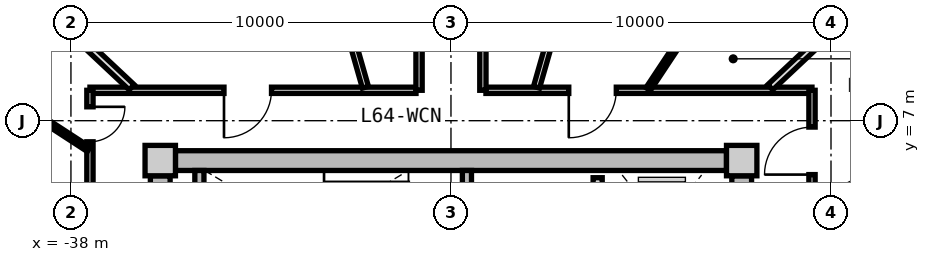
"""IFC4 building model, lengths in metres.
Left out: names, types, materials, properties, quantities, classifications, styles, units other than length and angle.
Written with IfcOpenShell. Run it as: python <this file> out.ifc"""

import sys

from ifc_helpers import new_model, si_unit, direction, frame, frame_2d, origin, origin_2d, place, context, subcontext, project, spatial, rectangle, extrude, source, transform, mapped, element, fill, save


model = new_model("IFC4")
c1 = context("Model", 3, precision=1e-05, world=origin(), true_north=direction((0.0, 1.0)))
c2 = subcontext(c1, "Body", "Model", "MODEL_VIEW")
j1 = project(units=[si_unit("LENGTHUNIT", "METRE"), si_unit("PLANEANGLEUNIT", "RADIAN")], contexts=[c1])
p1 = place(None, origin())
s1 = spatial("IfcSite", under=j1, at=p1, CompositionType="ELEMENT")
p2 = place(p1, origin())
s2 = spatial("IfcBuilding", under=s1, at=p2, CompositionType="ELEMENT")
p3 = place(p2, frame((0.0, 0.0, 207.8)))
s3 = spatial("IfcBuildingStorey", under=s2, at=p3, CompositionType="ELEMENT", Elevation=207.8)
m1 = source(origin(), c2, "Body", "SweptSolid", [
    extrude(rectangle(XDim=0.8, YDim=0.8, at=origin_2d()), origin(), (0.0, 0.0, 1.0), 3.05),
])
for number, where, z_axis, x_axis in (
    (1, (-20.35, 5.95, 0.0), (0.0, 0.0, 1.0), (1.0, 0.0, 0.0)),
    (2, (-35.65, 5.95, 0.0), (0.0, 0.0, 1.0), (1.0, 0.0, 0.0)),
):
    element("IfcColumn", number, at=place(p3, frame(where, z_axis=z_axis, x_axis=x_axis)), inside=s3, PredefinedType="COLUMN", context=c2, shape_type="MappedRepresentation", body=[
        mapped(m1, transform((0.0, 0.0, 0.0), x_axis=(1.0, 0.0, 0.0), y_axis=(0.0, 1.0, 0.0), z_axis=(0.0, 0.0, 1.0), scale=1.0)),
    ])
m2 = source(origin(), c2, "Body", "SweptSolid", [
    extrude(rectangle(XDim=14.5, YDim=0.52, at=frame_2d((7.25, 0.0))), origin(), (0.0, 0.0, 1.0), 2.76),
])
p4 = place(p3, frame((-35.25, 5.95, 0.0), z_axis=(0.0, 0.0, 1.0), x_axis=(1.0, 0.0, 0.0)))
e3 = element("IfcWall", 3, at=p4, inside=s3, PredefinedType="SHEAR", context=c2, shape_type="MappedRepresentation", body=[
    mapped(m2, transform((0.0, 0.0, 0.0), x_axis=(1.0, 0.0, 0.0), y_axis=(0.0, 1.0, 0.0), z_axis=(0.0, 0.0, 1.0), scale=1.0)),
])
m3 = source(origin(), c2, "Body", "SweptSolid", [
    extrude(rectangle(XDim=11.1, YDim=0.52, at=frame_2d((5.55, 0.0))), origin(), (0.0, 0.0, 1.0), 2.76),
])
p5 = place(p3, frame((-35.65, -5.55, 0.0), z_axis=(0.0, 0.0, 1.0), x_axis=(0.0, 1.0, 0.0)))
e4 = element("IfcWall", 4, at=p5, inside=s3, PredefinedType="SHEAR", context=c2, shape_type="MappedRepresentation", body=[
    mapped(m3, transform((0.0, 0.0, 0.0), x_axis=(1.0, 0.0, 0.0), y_axis=(0.0, 1.0, 0.0), z_axis=(0.0, 0.0, 1.0), scale=1.0)),
])
p6 = place(p5, frame((3.8, 0.0, 0.0)))
e5 = element("IfcOpeningElement", 5, at=p6, cuts=e4, PredefinedType="OPENING", context=c2, shape_type="SweptSolid", body=[
    extrude(rectangle(XDim=1.2, YDim=2.15, at=frame_2d((0.6, 1.075))), frame((0.0, 0.27, 0.0), z_axis=(0.0, -1.0, 0.0), x_axis=(1.0, 0.0, 0.0)), (0.0, 0.0, 1.0), 0.54),
])
p7 = place(p3, frame((-20.35, 5.55, 0.0), z_axis=(0.0, 0.0, 1.0), x_axis=(0.0, -1.0, 0.0)))
e6 = element("IfcWall", 6, at=p7, inside=s3, PredefinedType="SHEAR", context=c2, shape_type="MappedRepresentation", body=[
    mapped(m3, transform((0.0, 0.0, 0.0), x_axis=(1.0, 0.0, 0.0), y_axis=(0.0, 1.0, 0.0), z_axis=(0.0, 0.0, 1.0), scale=1.0)),
])
p8 = place(p7, frame((5.65, 0.0, 0.0)))
e7 = element("IfcOpeningElement", 7, at=p8, cuts=e6, PredefinedType="OPENING", context=c2, shape_type="SweptSolid", body=[
    extrude(rectangle(XDim=1.2, YDim=2.15, at=frame_2d((0.6, 1.075))), frame((0.0, 0.27, 0.0), z_axis=(0.0, -1.0, 0.0), x_axis=(1.0, 0.0, 0.0)), (0.0, 0.0, 1.0), 0.54),
])
p9 = place(p7, frame((9.3, 0.0, 0.0)))
e8 = element("IfcOpeningElement", 8, at=p9, cuts=e6, PredefinedType="OPENING", context=c2, shape_type="SweptSolid", body=[
    extrude(rectangle(XDim=1.0, YDim=2.1, at=frame_2d((0.5, 1.05))), frame((0.0, 0.27, 0.0), z_axis=(0.0, -1.0, 0.0), x_axis=(1.0, 0.0, 0.0)), (0.0, 0.0, 1.0), 0.54),
])
m4 = source(origin(), c2, "Body", "SweptSolid", [
    extrude(rectangle(XDim=3.24, YDim=0.24, at=frame_2d((1.62, 0.0))), origin(), (0.0, 0.0, 1.0), 2.76),
])
p10 = place(p3, frame((-34.62, 2.45, 0.0), z_axis=(0.0, 0.0, 1.0), x_axis=(0.0, 1.0, 0.0)))
e9 = element("IfcWall", 9, at=p10, inside=s3, PredefinedType="PARTITIONING", context=c2, shape_type="MappedRepresentation", body=[
    mapped(m4, transform((0.0, 0.0, 0.0), x_axis=(1.0, 0.0, 0.0), y_axis=(0.0, 1.0, 0.0), z_axis=(0.0, 0.0, 1.0), scale=1.0)),
])
p11 = place(p3, frame((-27.58, 2.45, 0.0), z_axis=(0.0, 0.0, 1.0), x_axis=(0.0, 1.0, 0.0)))
e10 = element("IfcWall", 10, at=p11, inside=s3, PredefinedType="PARTITIONING", context=c2, shape_type="MappedRepresentation", body=[
    mapped(m4, transform((0.0, 0.0, 0.0), x_axis=(1.0, 0.0, 0.0), y_axis=(0.0, 1.0, 0.0), z_axis=(0.0, 0.0, 1.0), scale=1.0)),
])
p12 = place(p11, frame((0.55, 0.0, 0.0)))
e11 = element("IfcOpeningElement", 11, at=p12, cuts=e10, PredefinedType="OPENING", context=c2, shape_type="SweptSolid", body=[
    extrude(rectangle(XDim=1.1, YDim=2.15, at=frame_2d((0.55, 1.075))), frame((0.0, 0.13, 0.0), z_axis=(0.0, -1.0, 0.0), x_axis=(1.0, 0.0, 0.0)), (0.0, 0.0, 1.0), 0.26),
])
m5 = source(origin(), c2, "Body", "SweptSolid", [
    extrude(rectangle(XDim=5.0, YDim=0.24, at=frame_2d((2.5, 0.0))), origin(), (0.0, 0.0, 1.0), 2.745),
])
p13 = place(p3, frame((-24.14, 0.5, 0.0), z_axis=(0.0, 0.0, 1.0), x_axis=(0.0, 1.0, 0.0)))
e12 = element("IfcWall", 12, at=p13, inside=s3, PredefinedType="PARTITIONING", context=c2, shape_type="MappedRepresentation", body=[
    mapped(m5, transform((0.0, 0.0, 0.0), x_axis=(1.0, 0.0, 0.0), y_axis=(0.0, 1.0, 0.0), z_axis=(0.0, 0.0, 1.0), scale=1.0)),
])
p14 = place(p13, frame((3.05, 0.0, 0.0)))
e13 = element("IfcOpeningElement", 13, at=p14, cuts=e12, PredefinedType="OPENING", context=c2, shape_type="SweptSolid", body=[
    extrude(rectangle(XDim=1.3, YDim=2.2, at=frame_2d((0.65, 1.1))), frame((0.0, 0.13, 0.0), z_axis=(0.0, -1.0, 0.0), x_axis=(1.0, 0.0, 0.0)), (0.0, 0.0, 1.0), 0.26),
])
p15 = place(p13, frame((0.55, 0.0, 0.0)))
e14 = element("IfcOpeningElement", 14, at=p15, cuts=e12, PredefinedType="OPENING", context=c2, shape_type="SweptSolid", body=[
    extrude(rectangle(XDim=1.3, YDim=2.2, at=frame_2d((0.65, 1.1))), frame((0.0, 0.13, 0.0), z_axis=(0.0, -1.0, 0.0), x_axis=(1.0, 0.0, 0.0)), (0.0, 0.0, 1.0), 0.26),
])
m6 = source(origin(), c2, "Body", "SweptSolid", [
    extrude(rectangle(XDim=8.58, YDim=0.165, at=frame_2d((4.29, 0.0))), origin(), (0.0, 0.0, 1.0), 2.745),
])
p16 = place(p3, frame((-37.5, 7.8, 0.0), z_axis=(0.0, 0.0, 1.0), x_axis=(1.0, 0.0, 0.0)))
e15 = element("IfcWall", 15, at=p16, inside=s3, PredefinedType="PARTITIONING", context=c2, shape_type="MappedRepresentation", body=[
    mapped(m6, transform((0.0, 0.0, 0.0), x_axis=(1.0, 0.0, 0.0), y_axis=(0.0, 1.0, 0.0), z_axis=(0.0, 0.0, 1.0), scale=1.0)),
])
p17 = place(p16, frame((3.528, 0.0, 0.0)))
e16 = element("IfcOpeningElement", 16, at=p17, cuts=e15, PredefinedType="OPENING", context=c2, shape_type="SweptSolid", body=[
    extrude(rectangle(XDim=1.25, YDim=2.2, at=frame_2d((0.625, 1.1))), frame((0.0, 0.093, 0.0), z_axis=(0.0, -1.0, 0.0), x_axis=(1.0, 0.0, 0.0)), (0.0, 0.0, 1.0), 0.185),
])
p18 = place(p3, frame((-27.08, 7.8, 0.0), z_axis=(0.0, 0.0, 1.0), x_axis=(1.0, 0.0, 0.0)))
e17 = element("IfcWall", 17, at=p18, inside=s3, PredefinedType="PARTITIONING", context=c2, shape_type="MappedRepresentation", body=[
    mapped(m6, transform((0.0, 0.0, 0.0), x_axis=(1.0, 0.0, 0.0), y_axis=(0.0, 1.0, 0.0), z_axis=(0.0, 0.0, 1.0), scale=1.0)),
])
p19 = place(p18, frame((2.18, 0.0, 0.0)))
e18 = element("IfcOpeningElement", 18, at=p19, cuts=e17, PredefinedType="OPENING", context=c2, shape_type="SweptSolid", body=[
    extrude(rectangle(XDim=1.25, YDim=2.2, at=frame_2d((0.625, 1.1))), frame((0.0, 0.093, 0.0), z_axis=(0.0, -1.0, 0.0), x_axis=(1.0, 0.0, 0.0)), (0.0, 0.0, 1.0), 0.185),
])
m7 = source(origin(), c2, "Body", "SweptSolid", [
    extrude(rectangle(XDim=6.88, YDim=0.165, at=frame_2d((3.44, 0.0))), origin(), (0.0, 0.0, 1.0), 2.745),
])
p20 = place(p3, frame((-37.5, 0.92, 0.0), z_axis=(0.0, 0.0, 1.0), x_axis=(0.0, 1.0, 0.0)))
e19 = element("IfcWall", 19, at=p20, inside=s3, PredefinedType="PARTITIONING", context=c2, shape_type="MappedRepresentation", body=[
    mapped(m7, transform((0.0, 0.0, 0.0), x_axis=(1.0, 0.0, 0.0), y_axis=(0.0, 1.0, 0.0), z_axis=(0.0, 0.0, 1.0), scale=1.0)),
])
p21 = place(p20, frame((5.525, 0.0, 0.0)))
e20 = element("IfcOpeningElement", 20, at=p21, cuts=e19, PredefinedType="OPENING", context=c2, shape_type="SweptSolid", body=[
    extrude(rectangle(XDim=0.92, YDim=2.1, at=frame_2d((0.46, 1.05))), frame((0.0, 0.093, 0.0), z_axis=(0.0, -1.0, 0.0), x_axis=(1.0, 0.0, 0.0)), (0.0, 0.0, 1.0), 0.185),
])
p22 = place(p20, frame((2.962, 0.0, 0.0)))
e21 = element("IfcOpeningElement", 21, at=p22, cuts=e19, PredefinedType="OPENING", context=c2, shape_type="SweptSolid", body=[
    extrude(rectangle(XDim=0.92, YDim=2.1, at=frame_2d((0.46, 1.05))), frame((0.0, 0.093, 0.0), z_axis=(0.0, -1.0, 0.0), x_axis=(1.0, 0.0, 0.0)), (0.0, 0.0, 1.0), 0.185),
])
p23 = place(p3, frame((-18.5, 7.8, 0.0), z_axis=(0.0, 0.0, 1.0), x_axis=(0.0, -1.0, 0.0)))
e22 = element("IfcWall", 22, at=p23, inside=s3, PredefinedType="PARTITIONING", context=c2, shape_type="MappedRepresentation", body=[
    mapped(m7, transform((0.0, 0.0, 0.0), x_axis=(1.0, 0.0, 0.0), y_axis=(0.0, 1.0, 0.0), z_axis=(0.0, 0.0, 1.0), scale=1.0)),
])
p24 = place(p23, frame((0.968, 0.0, 0.0)))
e23 = element("IfcOpeningElement", 23, at=p24, cuts=e22, PredefinedType="OPENING", context=c2, shape_type="SweptSolid", body=[
    extrude(rectangle(XDim=1.25, YDim=2.2, at=frame_2d((0.625, 1.1))), frame((0.0, 0.093, 0.0), z_axis=(0.0, -1.0, 0.0), x_axis=(1.0, 0.0, 0.0)), (0.0, 0.0, 1.0), 0.185),
])
m8 = source(origin(), c2, "Body", "SweptSolid", [
    extrude(rectangle(XDim=6.974, YDim=0.165, at=frame_2d((3.487, 0.0))), origin(), (0.0, 0.0, 1.0), 2.345),
])
for number, where, z_axis, x_axis in (
    (24, (-25.749, 7.88, 0.0), (0.0, 0.0, 1.0), (0.275, 0.962, 0.0)),
    (25, (-30.251, 7.88, 0.0), (0.0, 0.0, 1.0), (-0.275, 0.962, 0.0)),
):
    element("IfcWall", number, at=place(p3, frame(where, z_axis=z_axis, x_axis=x_axis)), inside=s3, PredefinedType="PARTITIONING", context=c2, shape_type="MappedRepresentation", body=[
        mapped(m8, transform((0.0, 0.0, 0.0), x_axis=(1.0, 0.0, 0.0), y_axis=(0.0, 1.0, 0.0), z_axis=(0.0, 0.0, 1.0), scale=1.0)),
    ])
m9 = source(origin(), c2, "Body", "SweptSolid", [
    extrude(rectangle(XDim=6.835, YDim=0.165, at=frame_2d((3.418, 0.0))), origin(), (0.0, 0.0, 1.0), 2.745),
])
p25 = place(p3, frame((-28.84, 7.8, 0.0), z_axis=(0.0, 0.0, 1.0), x_axis=(0.0, 1.0, 0.0)))
e26 = element("IfcWall", 26, at=p25, inside=s3, PredefinedType="PARTITIONING", context=c2, shape_type="MappedRepresentation", body=[
    mapped(m9, transform((0.0, 0.0, 0.0), x_axis=(1.0, 0.0, 0.0), y_axis=(0.0, 1.0, 0.0), z_axis=(0.0, 0.0, 1.0), scale=1.0)),
])
p26 = place(p25, frame((2.943, 0.0, 0.0)))
e27 = element("IfcOpeningElement", 27, at=p26, cuts=e26, PredefinedType="OPENING", context=c2, shape_type="SweptSolid", body=[
    extrude(rectangle(XDim=0.95, YDim=2.1, at=frame_2d((0.475, 1.05))), frame((0.0, 0.093, 0.0), z_axis=(0.0, -1.0, 0.0), x_axis=(1.0, 0.0, 0.0)), (0.0, 0.0, 1.0), 0.185),
])
p27 = place(p3, frame((-27.16, 14.635, 0.0), z_axis=(0.0, 0.0, 1.0), x_axis=(0.0, -1.0, 0.0)))
e28 = element("IfcWall", 28, at=p27, inside=s3, PredefinedType="PARTITIONING", context=c2, shape_type="MappedRepresentation", body=[
    mapped(m9, transform((0.0, 0.0, 0.0), x_axis=(1.0, 0.0, 0.0), y_axis=(0.0, 1.0, 0.0), z_axis=(0.0, 0.0, 1.0), scale=1.0)),
])
p28 = place(p27, frame((2.943, 0.0, 0.0)))
e29 = element("IfcOpeningElement", 29, at=p28, cuts=e28, PredefinedType="OPENING", context=c2, shape_type="SweptSolid", body=[
    extrude(rectangle(XDim=0.95, YDim=2.1, at=frame_2d((0.475, 1.05))), frame((0.0, 0.093, 0.0), z_axis=(0.0, -1.0, 0.0), x_axis=(1.0, 0.0, 0.0)), (0.0, 0.0, 1.0), 0.185),
])
m10 = source(origin(), c2, "Body", "SweptSolid", [
    extrude(rectangle(XDim=4.089, YDim=0.19, at=frame_2d((2.044, 0.0))), origin(), (0.0, 0.0, 1.0), 2.345),
])
p29 = place(p3, frame((-19.598, 7.88, 0.0), z_axis=(0.0, 0.0, 1.0), x_axis=(0.729401273609, 0.684086092577, 0.0)))
e30 = element("IfcWall", 30, at=p29, inside=s3, PredefinedType="PARTITIONING", context=c2, shape_type="MappedRepresentation", body=[
    mapped(m10, transform((0.0, 0.0, 0.0), x_axis=(1.0, 0.0, 0.0), y_axis=(0.0, 1.0, 0.0), z_axis=(0.0, 0.0, 1.0), scale=1.0)),
])
m11 = source(origin(), c2, "Body", "SweptSolid", [
    extrude(rectangle(XDim=2.06, YDim=0.14, at=frame_2d((1.03, 0.0))), origin(), (0.0, 0.0, 1.0), 2.745),
])
p30 = place(p3, frame((-18.47, 4.778, 0.0), z_axis=(0.0, 0.0, 1.0), x_axis=(0.893952568722, 0.448161583444, 0.0)))
e31 = element("IfcWall", 31, at=p30, inside=s3, PredefinedType="PARTITIONING", context=c2, shape_type="MappedRepresentation", body=[
    mapped(m11, transform((0.0, 0.0, 0.0), x_axis=(1.0, 0.0, 0.0), y_axis=(0.0, 1.0, 0.0), z_axis=(0.0, 0.0, 1.0), scale=1.0)),
])
m12 = source(origin(), c2, "Body", "SweptSolid", [
    extrude(rectangle(XDim=2.953, YDim=0.14, at=frame_2d((1.476, 0.0))), origin(), (0.0, 0.0, 1.0), 2.745),
])
p31 = place(p3, frame((-22.812, 7.83, 0.0), z_axis=(0.0, 0.0, 1.0), x_axis=(0.552427436518, 0.833560991999, 0.0)))
e32 = element("IfcWall", 32, at=p31, inside=s3, PredefinedType="PARTITIONING", context=c2, shape_type="MappedRepresentation", body=[
    mapped(m12, transform((0.0, 0.0, 0.0), x_axis=(1.0, 0.0, 0.0), y_axis=(0.0, 1.0, 0.0), z_axis=(0.0, 0.0, 1.0), scale=1.0)),
])
p32 = place(p3, frame((-36.402, 7.88, 0.0), z_axis=(0.0, 0.0, 1.0), x_axis=(-0.729401273609, 0.684086092577, 0.0)))
e33 = element("IfcWall", 33, at=p32, inside=s3, PredefinedType="PARTITIONING", context=c2, shape_type="MappedRepresentation", body=[
    mapped(m10, transform((0.0, 0.0, 0.0), x_axis=(1.0, 0.0, 0.0), y_axis=(0.0, 1.0, 0.0), z_axis=(0.0, 0.0, 1.0), scale=1.0)),
])
m13 = source(origin(), c2, "Body", "SweptSolid", [
    extrude(rectangle(XDim=3.904, YDim=0.14, at=frame_2d((1.952, 0.0))), origin(), (0.0, 0.0, 1.0), 2.745),
])
p33 = place(p3, frame((-37.53, 6.246, 0.0), z_axis=(0.0, 0.0, 1.0), x_axis=(-0.838024687996, 0.545632314209, 0.0)))
e34 = element("IfcWall", 34, at=p33, inside=s3, PredefinedType="PARTITIONING", context=c2, shape_type="MappedRepresentation", body=[
    mapped(m13, transform((0.0, 0.0, 0.0), x_axis=(1.0, 0.0, 0.0), y_axis=(0.0, 1.0, 0.0), z_axis=(0.0, 0.0, 1.0), scale=1.0)),
])
m14 = source(origin(), c2, "Body", "SweptSolid", [
    extrude(rectangle(XDim=1.25, YDim=2.2, at=frame_2d((0.625, 1.1))), frame((0.0, 0.025, 0.0), z_axis=(0.0, -1.0, 0.0), x_axis=(1.0, 0.0, 0.0)), (0.0, 0.0, 1.0), 0.05),
])
p34 = place(p24, frame((1.25, 0.0, 0.0), z_axis=(0.0, 0.0, 1.0), x_axis=(-1.0, 0.0, 0.0)))
e35 = element("IfcDoor", 35, at=p34, inside=s3, OperationType="SINGLE_SWING_LEFT", PredefinedType="DOOR", context=c2, shape_type="MappedRepresentation", body=[
    mapped(m14, transform((0.0, 0.0, 0.0), x_axis=(1.0, 0.0, 0.0), y_axis=(0.0, 1.0, 0.0), z_axis=(0.0, 0.0, 1.0), scale=1.0)),
])
fill(e23, e35)
p35 = place(p19, frame((1.25, 0.0, 0.0), z_axis=(0.0, 0.0, 1.0), x_axis=(-1.0, 0.0, 0.0)))
e36 = element("IfcDoor", 36, at=p35, inside=s3, OperationType="SINGLE_SWING_RIGHT", PredefinedType="DOOR", context=c2, shape_type="MappedRepresentation", body=[
    mapped(m14, transform((0.0, 0.0, 0.0), x_axis=(1.0, 0.0, 0.0), y_axis=(0.0, 1.0, 0.0), z_axis=(0.0, 0.0, 1.0), scale=1.0)),
])
fill(e18, e36)
p36 = place(p17, frame((1.25, 0.0, 0.0), z_axis=(0.0, 0.0, 1.0), x_axis=(-1.0, 0.0, 0.0)))
e37 = element("IfcDoor", 37, at=p36, inside=s3, OperationType="SINGLE_SWING_RIGHT", PredefinedType="DOOR", context=c2, shape_type="MappedRepresentation", body=[
    mapped(m14, transform((0.0, 0.0, 0.0), x_axis=(1.0, 0.0, 0.0), y_axis=(0.0, 1.0, 0.0), z_axis=(0.0, 0.0, 1.0), scale=1.0)),
])
fill(e16, e37)
m15 = source(origin(), c2, "Body", "SweptSolid", [
    extrude(rectangle(XDim=0.92, YDim=2.1, at=frame_2d((0.46, 1.05))), frame((0.0, 0.025, 0.0), z_axis=(0.0, -1.0, 0.0), x_axis=(1.0, 0.0, 0.0)), (0.0, 0.0, 1.0), 0.05),
])
p37 = place(p21, frame((0.92, 0.0, 0.0), z_axis=(0.0, 0.0, 1.0), x_axis=(-1.0, 0.0, 0.0)))
e38 = element("IfcDoor", 38, at=p37, inside=s3, OperationType="SINGLE_SWING_LEFT", PredefinedType="DOOR", context=c2, shape_type="MappedRepresentation", body=[
    mapped(m15, transform((0.0, 0.0, 0.0), x_axis=(1.0, 0.0, 0.0), y_axis=(0.0, 1.0, 0.0), z_axis=(0.0, 0.0, 1.0), scale=1.0)),
])
fill(e20, e38)
save(model, sys.argv[1])
